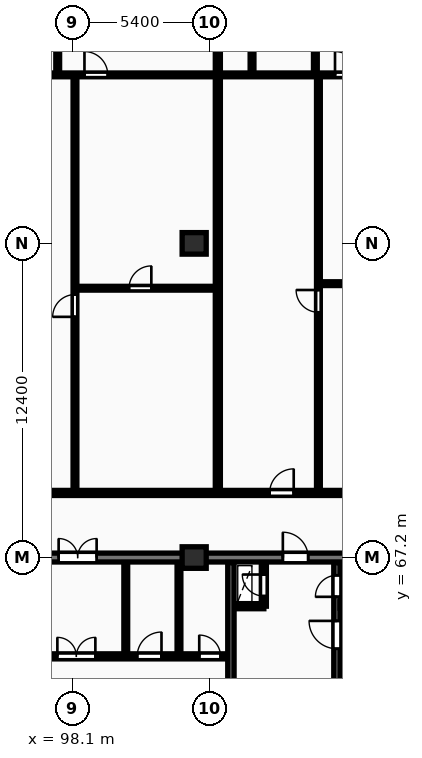
"""IFC4 building model, lengths in metres.
Left out: names, types, materials, properties, quantities, classifications, styles, units other than length and angle.
Written with IfcOpenShell. Run it as: python <this file> out.ifc"""

import sys

from ifc_helpers import new_model, si_unit, direction, frame, frame_2d, origin, origin_2d, place, context, subcontext, project, spatial, rectangle, extrude, element, fill, save


model = new_model("IFC4")
c1 = context("Model", 3, precision=1e-05, world=origin(), true_north=direction((0.0, 1.0)))
c2 = subcontext(c1, "Body", "Model", "MODEL_VIEW")
j1 = project(units=[si_unit("LENGTHUNIT", "METRE"), si_unit("PLANEANGLEUNIT", "RADIAN")], contexts=[c1])
p1 = place(None, origin())
s1 = spatial("IfcSite", under=j1, at=p1, CompositionType="ELEMENT")
p2 = place(p1, origin())
s2 = spatial("IfcBuilding", under=s1, at=p2, CompositionType="ELEMENT")
p3 = place(p2, frame((0.0, 0.0, 100.3)))
s3 = spatial("IfcBuildingStorey", under=s2, at=p3, CompositionType="ELEMENT", Elevation=100.3)
for number, where, z_axis, x_axis in (
    (1, (102.9, 67.2, 0.0), (0.0, 0.0, 1.0), (1.0, 0.0, 0.0)),
    (2, (102.9, 79.6, 0.0), (0.0, 0.0, 1.0), (1.0, 0.0, 0.0)),
):
    element("IfcColumn", number, at=place(p3, frame(where, z_axis=z_axis, x_axis=x_axis)), inside=s3, PredefinedType="COLUMN", context=c2, shape_type="SweptSolid", body=[
        extrude(rectangle(XDim=0.95, YDim=0.85, at=origin_2d()), origin(), (0.0, 0.0, 1.0), 3.25),
    ])
p4 = place(p3, frame((75.95, 67.2, 0.0), z_axis=(0.0, 0.0, 1.0), x_axis=(1.0, 0.0, 0.0)))
e3 = element("IfcWall", 3, at=p4, inside=s3, PredefinedType="SHEAR", context=c2, shape_type="SweptSolid", body=[
    extrude(rectangle(XDim=36.3, YDim=0.35, at=frame_2d((18.15, 0.0))), origin(), (0.0, 0.0, 1.0), 3.25),
])
p5 = place(p4, frame((5.25, 0.0, 0.0)))
e4 = element("IfcOpeningElement", 4, at=p5, cuts=e3, PredefinedType="OPENING", context=c2, shape_type="SweptSolid", body=[
    extrude(rectangle(XDim=1.0, YDim=2.15, at=frame_2d((0.5, 1.075))), frame((0.0, 0.185, 0.0), z_axis=(0.0, -1.0, 0.0), x_axis=(1.0, 0.0, 0.0)), (0.0, 0.0, 1.0), 0.37),
])
p6 = place(p4, frame((21.6, 0.0, 0.0)))
e5 = element("IfcOpeningElement", 5, at=p6, cuts=e3, PredefinedType="OPENING", context=c2, shape_type="SweptSolid", body=[
    extrude(rectangle(XDim=1.5, YDim=2.2, at=frame_2d((0.75, 1.1))), frame((0.0, 0.185, 0.0), z_axis=(0.0, -1.0, 0.0), x_axis=(1.0, 0.0, 0.0)), (0.0, 0.0, 1.0), 0.37),
])
p7 = place(p4, frame((30.45, 0.0, 0.0)))
e6 = element("IfcOpeningElement", 6, at=p7, cuts=e3, PredefinedType="OPENING", context=c2, shape_type="SweptSolid", body=[
    extrude(rectangle(XDim=1.0, YDim=2.15, at=frame_2d((0.5, 1.075))), frame((0.0, 0.185, 0.0), z_axis=(0.0, -1.0, 0.0), x_axis=(1.0, 0.0, 0.0)), (0.0, 0.0, 1.0), 0.37),
])
for number, where, z_axis, x_axis in (
    (7, (102.3, 63.4, 0.0), (0.0, 0.0, 1.0), (0.0, 1.0, 0.0)),
    (8, (100.2, 63.4, 0.0), (0.0, 0.0, 1.0), (0.0, 1.0, 0.0)),
):
    element("IfcWall", number, at=place(p3, frame(where, z_axis=z_axis, x_axis=x_axis)), inside=s3, PredefinedType="PARTITIONING", context=c2, shape_type="SweptSolid", body=[
        extrude(rectangle(XDim=3.6, YDim=0.15, at=frame_2d((1.8, 0.0))), origin(), (0.0, 0.0, 1.0), 2.97),
    ])
p8 = place(p3, frame((84.42, 63.3, 0.0), z_axis=(0.0, 0.0, 1.0), x_axis=(1.0, 0.0, 0.0)))
e9 = element("IfcWall", 9, at=p8, inside=s3, PredefinedType="PARTITIONING", context=c2, shape_type="SweptSolid", body=[
    extrude(rectangle(XDim=19.83, YDim=0.2, at=frame_2d((9.915, 0.0))), origin(), (0.0, 0.0, 1.0), 2.97),
])
p9 = place(p8, frame((1.15, 0.0, 0.0)))
e10 = element("IfcOpeningElement", 10, at=p9, cuts=e9, PredefinedType="OPENING", context=c2, shape_type="SweptSolid", body=[
    extrude(rectangle(XDim=0.85, YDim=2.05, at=frame_2d((0.425, 1.025))), frame((0.0, 0.11, 0.0), z_axis=(0.0, -1.0, 0.0), x_axis=(1.0, 0.0, 0.0)), (0.0, 0.0, 1.0), 0.22),
])
p10 = place(p8, frame((3.25, 0.0, 0.0)))
e11 = element("IfcOpeningElement", 11, at=p10, cuts=e9, PredefinedType="OPENING", context=c2, shape_type="SweptSolid", body=[
    extrude(rectangle(XDim=0.85, YDim=2.05, at=frame_2d((0.425, 1.025))), frame((0.0, 0.11, 0.0), z_axis=(0.0, -1.0, 0.0), x_axis=(1.0, 0.0, 0.0)), (0.0, 0.0, 1.0), 0.22),
])
p11 = place(p8, frame((13.08, 0.0, 0.0)))
e12 = element("IfcOpeningElement", 12, at=p11, cuts=e9, PredefinedType="OPENING", context=c2, shape_type="SweptSolid", body=[
    extrude(rectangle(XDim=1.5, YDim=2.2, at=frame_2d((0.75, 1.1))), frame((0.0, 0.11, 0.0), z_axis=(0.0, -1.0, 0.0), x_axis=(1.0, 0.0, 0.0)), (0.0, 0.0, 1.0), 0.22),
])
p12 = place(p8, frame((5.53, 0.0, 0.0)))
e13 = element("IfcOpeningElement", 13, at=p12, cuts=e9, PredefinedType="OPENING", context=c2, shape_type="SweptSolid", body=[
    extrude(rectangle(XDim=0.88, YDim=2.06, at=frame_2d((0.44, 1.03))), frame((0.0, 0.11, 0.0), z_axis=(0.0, -1.0, 0.0), x_axis=(1.0, 0.0, 0.0)), (0.0, 0.0, 1.0), 0.22),
])
p13 = place(p8, frame((7.68, 0.0, 0.0)))
e14 = element("IfcOpeningElement", 14, at=p13, cuts=e9, PredefinedType="OPENING", context=c2, shape_type="SweptSolid", body=[
    extrude(rectangle(XDim=0.88, YDim=2.06, at=frame_2d((0.44, 1.03))), frame((0.0, 0.11, 0.0), z_axis=(0.0, -1.0, 0.0), x_axis=(1.0, 0.0, 0.0)), (0.0, 0.0, 1.0), 0.22),
])
p14 = place(p8, frame((10.43, 0.0, 0.0)))
e15 = element("IfcOpeningElement", 15, at=p14, cuts=e9, PredefinedType="OPENING", context=c2, shape_type="SweptSolid", body=[
    extrude(rectangle(XDim=0.85, YDim=2.05, at=frame_2d((0.425, 1.025))), frame((0.0, 0.11, 0.0), z_axis=(0.0, -1.0, 0.0), x_axis=(1.0, 0.0, 0.0)), (0.0, 0.0, 1.0), 0.22),
])
p15 = place(p8, frame((16.23, 0.0, 0.0)))
e16 = element("IfcOpeningElement", 16, at=p15, cuts=e9, PredefinedType="OPENING", context=c2, shape_type="SweptSolid", body=[
    extrude(rectangle(XDim=0.96, YDim=2.1, at=frame_2d((0.48, 1.05))), frame((0.0, 0.11, 0.0), z_axis=(0.0, -1.0, 0.0), x_axis=(1.0, 0.0, 0.0)), (0.0, 0.0, 1.0), 0.22),
])
p16 = place(p8, frame((18.68, 0.0, 0.0)))
e17 = element("IfcOpeningElement", 17, at=p16, cuts=e9, PredefinedType="OPENING", context=c2, shape_type="SweptSolid", body=[
    extrude(rectangle(XDim=0.84, YDim=2.04, at=frame_2d((0.42, 1.02))), frame((0.0, 0.11, 0.0), z_axis=(0.0, -1.0, 0.0), x_axis=(1.0, 0.0, 0.0)), (0.0, 0.0, 1.0), 0.22),
])
p17 = place(p3, frame((104.45, 65.28, 0.0), z_axis=(0.0, 0.0, 1.0), x_axis=(1.0, 0.0, 0.0)))
e18 = element("IfcWall", 18, at=p17, inside=s3, PredefinedType="PARTITIONING", context=c2, shape_type="SweptSolid", body=[
    extrude(rectangle(XDim=1.2, YDim=0.2, at=frame_2d((0.6, 0.0))), origin(), (0.0, 0.0, 1.0), 2.97),
])
p18 = place(p3, frame((105.65, 65.28, 0.0), z_axis=(0.0, 0.0, 1.0), x_axis=(0.0, 1.0, 0.0)))
e19 = element("IfcWall", 19, at=p18, inside=s3, PredefinedType="PARTITIONING", context=c2, shape_type="SweptSolid", body=[
    extrude(rectangle(XDim=1.72, YDim=0.2, at=frame_2d((0.86, 0.0))), origin(), (0.0, 0.0, 1.0), 2.97),
])
p19 = place(p18, frame((0.4, 0.0, 0.0)))
e20 = element("IfcOpeningElement", 20, at=p19, cuts=e19, PredefinedType="OPENING", context=c2, shape_type="SweptSolid", body=[
    extrude(rectangle(XDim=0.85, YDim=2.05, at=frame_2d((0.425, 1.025))), frame((0.0, 0.11, 0.0), z_axis=(0.0, -1.0, 0.0), x_axis=(1.0, 0.0, 0.0)), (0.0, 0.0, 1.0), 0.22),
])
p20 = place(p3, frame((104.35, 58.4, 0.0), z_axis=(0.0, 0.0, 1.0), x_axis=(0.0, 1.0, 0.0)))
e21 = element("IfcWall", 21, at=p20, inside=s3, PredefinedType="SHEAR", context=c2, shape_type="SweptSolid", body=[
    extrude(rectangle(XDim=8.6, YDim=0.25, at=frame_2d((4.3, 0.0))), origin(), (0.0, 0.0, 1.0), 3.25),
])
p21 = place(p20, frame((1.8, 0.0, 0.0)))
e22 = element("IfcOpeningElement", 22, at=p21, cuts=e21, PredefinedType="OPENING", context=c2, shape_type="SweptSolid", body=[
    extrude(rectangle(XDim=1.1, YDim=2.1, at=frame_2d((0.55, 1.05))), frame((0.0, 0.135, 0.0), z_axis=(0.0, -1.0, 0.0), x_axis=(1.0, 0.0, 0.0)), (0.0, 0.0, 1.0), 0.27),
])
p22 = place(p3, frame((108.535, 55.4, 0.0), z_axis=(0.0, 0.0, 1.0), x_axis=(0.0, 1.0, 0.0)))
e23 = element("IfcWall", 23, at=p22, inside=s3, PredefinedType="SHEAR", context=c2, shape_type="SweptSolid", body=[
    extrude(rectangle(XDim=11.6, YDim=0.25, at=frame_2d((5.8, 0.0))), origin(), (0.0, 0.0, 1.0), 3.25),
])
p23 = place(p22, frame((8.2, 0.0, 0.0)))
e24 = element("IfcOpeningElement", 24, at=p23, cuts=e23, PredefinedType="OPENING", context=c2, shape_type="SweptSolid", body=[
    extrude(rectangle(XDim=1.1, YDim=2.1, at=frame_2d((0.55, 1.05))), frame((0.0, 0.135, 0.0), z_axis=(0.0, -1.0, 0.0), x_axis=(1.0, 0.0, 0.0)), (0.0, 0.0, 1.0), 0.27),
])
p24 = place(p22, frame((10.25, 0.0, 0.0)))
e25 = element("IfcOpeningElement", 25, at=p24, cuts=e23, PredefinedType="OPENING", context=c2, shape_type="SweptSolid", body=[
    extrude(rectangle(XDim=0.85, YDim=2.05, at=frame_2d((0.425, 1.025))), frame((0.0, 0.135, 0.0), z_axis=(0.0, -1.0, 0.0), x_axis=(1.0, 0.0, 0.0)), (0.0, 0.0, 1.0), 0.27),
])
p25 = place(p3, frame((108.66, 65.325, 0.0), z_axis=(0.0, 0.0, 1.0), x_axis=(1.0, 0.0, 0.0)))
e26 = element("IfcWall", 26, at=p25, inside=s3, PredefinedType="SHEAR", context=c2, shape_type="SweptSolid", body=[
    extrude(rectangle(XDim=3.24, YDim=0.25, at=frame_2d((1.62, 0.0))), origin(), (0.0, 0.0, 1.0), 3.25),
])
p26 = place(p3, frame((103.834, 69.83, 0.0), z_axis=(0.0, 0.0, 1.0), x_axis=(0.0, 1.0, 0.0)))
e27 = element("IfcWall", 27, at=p26, inside=s3, PredefinedType="PARTITIONING", context=c2, shape_type="SweptSolid", body=[
    extrude(rectangle(XDim=26.07, YDim=0.2, at=frame_2d((13.035, 0.0))), origin(), (0.0, 0.0, 1.0), 2.97),
])
p27 = place(p3, frame((98.255, 77.83, 0.0), z_axis=(0.0, 0.0, 1.0), x_axis=(1.0, 0.0, 0.0)))
e28 = element("IfcWall", 28, at=p27, inside=s3, PredefinedType="PARTITIONING", context=c2, shape_type="SweptSolid", body=[
    extrude(rectangle(XDim=5.499, YDim=0.15, at=frame_2d((2.75, 0.0))), origin(), (0.0, 0.0, 1.0), 2.97),
])
p28 = place(p27, frame((2.074, 0.0, 0.0)))
e29 = element("IfcOpeningElement", 29, at=p28, cuts=e28, PredefinedType="OPENING", context=c2, shape_type="SweptSolid", body=[
    extrude(rectangle(XDim=0.88, YDim=2.06, at=frame_2d((0.44, 1.03))), frame((0.0, 0.085, 0.0), z_axis=(0.0, -1.0, 0.0), x_axis=(1.0, 0.0, 0.0)), (0.0, 0.0, 1.0), 0.17),
])
p29 = place(p3, frame((98.195, 69.81, 0.0), z_axis=(0.0, 0.0, 1.0), x_axis=(0.0, 1.0, 0.0)))
e30 = element("IfcWall", 30, at=p29, inside=s3, PredefinedType="PARTITIONING", context=c2, shape_type="SweptSolid", body=[
    extrude(rectangle(XDim=16.4, YDim=0.15, at=frame_2d((8.2, 0.0))), origin(), (0.0, 0.0, 1.0), 2.97),
])
p30 = place(p29, frame((6.89, 0.0, 0.0)))
e31 = element("IfcOpeningElement", 31, at=p30, cuts=e30, PredefinedType="OPENING", context=c2, shape_type="SweptSolid", body=[
    extrude(rectangle(XDim=0.88, YDim=2.06, at=frame_2d((0.44, 1.03))), frame((0.0, 0.085, 0.0), z_axis=(0.0, -1.0, 0.0), x_axis=(1.0, 0.0, 0.0)), (0.0, 0.0, 1.0), 0.17),
])
p31 = place(p3, frame((97.514, 86.29, 0.0), z_axis=(0.0, 0.0, 1.0), x_axis=(0.0, 1.0, 0.0)))
e32 = element("IfcWall", 32, at=p31, inside=s3, PredefinedType="PARTITIONING", context=c2, shape_type="SweptSolid", body=[
    extrude(rectangle(XDim=5.0, YDim=0.15, at=frame_2d((2.5, 0.0))), origin(), (0.0, 0.0, 1.0), 2.97),
])
p32 = place(p31, frame((2.08, 0.0, 0.0)))
e33 = element("IfcOpeningElement", 33, at=p32, cuts=e32, PredefinedType="OPENING", context=c2, shape_type="SweptSolid", body=[
    extrude(rectangle(XDim=0.84, YDim=2.04, at=frame_2d((0.42, 1.02))), frame((0.0, 0.085, 0.0), z_axis=(0.0, -1.0, 0.0), x_axis=(1.0, 0.0, 0.0)), (0.0, 0.0, 1.0), 0.17),
])
p33 = place(p3, frame((94.305, 86.25, 0.0), z_axis=(0.0, 0.0, 1.0), x_axis=(1.0, 0.0, 0.0)))
e34 = element("IfcWall", 34, at=p33, inside=s3, PredefinedType="PARTITIONING", context=c2, shape_type="SweptSolid", body=[
    extrude(rectangle(XDim=9.449, YDim=0.15, at=frame_2d((4.725, 0.0))), origin(), (0.0, 0.0, 1.0), 2.97),
])
p34 = place(p33, frame((4.264, 0.0, 0.0)))
e35 = element("IfcOpeningElement", 35, at=p34, cuts=e34, PredefinedType="OPENING", context=c2, shape_type="SweptSolid", body=[
    extrude(rectangle(XDim=0.92, YDim=2.08, at=frame_2d((0.46, 1.04))), frame((0.0, 0.085, 0.0), z_axis=(0.0, -1.0, 0.0), x_axis=(1.0, 0.0, 0.0)), (0.0, 0.0, 1.0), 0.17),
])
p35 = place(p3, frame((107.864, 78.01, 0.0), z_axis=(0.0, 0.0, 1.0), x_axis=(1.0, 0.0, 0.0)))
e36 = element("IfcWall", 36, at=p35, inside=s3, PredefinedType="PARTITIONING", context=c2, shape_type="SweptSolid", body=[
    extrude(rectangle(XDim=6.06, YDim=0.15, at=frame_2d((3.03, 0.0))), origin(), (0.0, 0.0, 1.0), 2.97),
])
p36 = place(p35, frame((1.694, 0.0, 0.0)))
e37 = element("IfcOpeningElement", 37, at=p36, cuts=e36, PredefinedType="OPENING", context=c2, shape_type="SweptSolid", body=[
    extrude(rectangle(XDim=0.88, YDim=2.06, at=frame_2d((0.44, 1.03))), frame((0.0, 0.085, 0.0), z_axis=(0.0, -1.0, 0.0), x_axis=(1.0, 0.0, 0.0)), (0.0, 0.0, 1.0), 0.17),
])
p37 = place(p3, frame((107.804, 69.81, 0.0), z_axis=(0.0, 0.0, 1.0), x_axis=(0.0, 1.0, 0.0)))
e38 = element("IfcWall", 38, at=p37, inside=s3, PredefinedType="PARTITIONING", context=c2, shape_type="SweptSolid", body=[
    extrude(rectangle(XDim=16.4, YDim=0.15, at=frame_2d((8.2, 0.0))), origin(), (0.0, 0.0, 1.0), 2.97),
])
p38 = place(p37, frame((7.07, 0.0, 0.0)))
e39 = element("IfcOpeningElement", 39, at=p38, cuts=e38, PredefinedType="OPENING", context=c2, shape_type="SweptSolid", body=[
    extrude(rectangle(XDim=0.88, YDim=2.06, at=frame_2d((0.44, 1.03))), frame((0.0, 0.085, 0.0), z_axis=(0.0, -1.0, 0.0), x_axis=(1.0, 0.0, 0.0)), (0.0, 0.0, 1.0), 0.17),
])
p39 = place(p3, frame((105.184, 86.29, 0.0), z_axis=(0.0, 0.0, 1.0), x_axis=(0.0, 1.0, 0.0)))
e40 = element("IfcWall", 40, at=p39, inside=s3, PredefinedType="PARTITIONING", context=c2, shape_type="SweptSolid", body=[
    extrude(rectangle(XDim=5.0, YDim=0.15, at=frame_2d((2.5, 0.0))), origin(), (0.0, 0.0, 1.0), 2.97),
])
p40 = place(p39, frame((2.08, 0.0, 0.0)))
e41 = element("IfcOpeningElement", 41, at=p40, cuts=e40, PredefinedType="OPENING", context=c2, shape_type="SweptSolid", body=[
    extrude(rectangle(XDim=0.84, YDim=2.04, at=frame_2d((0.42, 1.02))), frame((0.0, 0.085, 0.0), z_axis=(0.0, -1.0, 0.0), x_axis=(1.0, 0.0, 0.0)), (0.0, 0.0, 1.0), 0.17),
])
p41 = place(p3, frame((107.684, 86.29, 0.0), z_axis=(0.0, 0.0, 1.0), x_axis=(0.0, 1.0, 0.0)))
e42 = element("IfcWall", 42, at=p41, inside=s3, PredefinedType="PARTITIONING", context=c2, shape_type="SweptSolid", body=[
    extrude(rectangle(XDim=5.0, YDim=0.15, at=frame_2d((2.5, 0.0))), origin(), (0.0, 0.0, 1.0), 2.97),
])
p42 = place(p41, frame((2.08, 0.0, 0.0)))
e43 = element("IfcOpeningElement", 43, at=p42, cuts=e42, PredefinedType="OPENING", context=c2, shape_type="SweptSolid", body=[
    extrude(rectangle(XDim=0.84, YDim=2.04, at=frame_2d((0.42, 1.02))), frame((0.0, 0.085, 0.0), z_axis=(0.0, -1.0, 0.0), x_axis=(1.0, 0.0, 0.0)), (0.0, 0.0, 1.0), 0.17),
])
p43 = place(p3, frame((103.914, 86.25, 0.0), z_axis=(0.0, 0.0, 1.0), x_axis=(1.0, 0.0, 0.0)))
e44 = element("IfcWall", 44, at=p43, inside=s3, PredefinedType="PARTITIONING", context=c2, shape_type="SweptSolid", body=[
    extrude(rectangle(XDim=10.01, YDim=0.15, at=frame_2d((5.005, 0.0))), origin(), (0.0, 0.0, 1.0), 2.97),
])
p44 = place(p43, frame((4.545, 0.0, 0.0)))
e45 = element("IfcOpeningElement", 45, at=p44, cuts=e44, PredefinedType="OPENING", context=c2, shape_type="SweptSolid", body=[
    extrude(rectangle(XDim=0.92, YDim=2.08, at=frame_2d((0.46, 1.04))), frame((0.0, 0.085, 0.0), z_axis=(0.0, -1.0, 0.0), x_axis=(1.0, 0.0, 0.0)), (0.0, 0.0, 1.0), 0.17),
])
p45 = place(p3, frame((57.6, 69.75, 0.0), z_axis=(0.0, 0.0, 1.0), x_axis=(1.0, 0.0, 0.0)))
e46 = element("IfcWall", 46, at=p45, inside=s3, PredefinedType="PARTITIONING", context=c2, shape_type="SweptSolid", body=[
    extrude(rectangle(XDim=73.0, YDim=0.2, at=frame_2d((36.5, 0.0))), origin(), (0.0, 0.0, 1.0), 2.97),
])
p46 = place(p45, frame((7.326, 0.0, 0.0)))
e47 = element("IfcOpeningElement", 47, at=p46, cuts=e46, PredefinedType="OPENING", context=c2, shape_type="SweptSolid", body=[
    extrude(rectangle(XDim=1.22, YDim=2.18, at=frame_2d((0.61, 1.09))), frame((0.0, 0.11, 0.0), z_axis=(0.0, -1.0, 0.0), x_axis=(1.0, 0.0, 0.0)), (0.0, 0.0, 1.0), 0.22),
])
p47 = place(p45, frame((23.795, 0.0, 0.0)))
e48 = element("IfcOpeningElement", 48, at=p47, cuts=e46, PredefinedType="OPENING", context=c2, shape_type="SweptSolid", body=[
    extrude(rectangle(XDim=1.22, YDim=2.18, at=frame_2d((0.61, 1.09))), frame((0.0, 0.11, 0.0), z_axis=(0.0, -1.0, 0.0), x_axis=(1.0, 0.0, 0.0)), (0.0, 0.0, 1.0), 0.22),
])
p48 = place(p45, frame((38.67, 0.0, 0.0)))
e49 = element("IfcOpeningElement", 49, at=p48, cuts=e46, PredefinedType="OPENING", context=c2, shape_type="SweptSolid", body=[
    extrude(rectangle(XDim=0.95, YDim=2.15, at=frame_2d((0.475, 1.075))), frame((0.0, 0.11, 0.0), z_axis=(0.0, -1.0, 0.0), x_axis=(1.0, 0.0, 0.0)), (0.0, 0.0, 1.0), 0.22),
])
p49 = place(p45, frame((48.279, 0.0, 0.0)))
e50 = element("IfcOpeningElement", 50, at=p49, cuts=e46, PredefinedType="OPENING", context=c2, shape_type="SweptSolid", body=[
    extrude(rectangle(XDim=0.95, YDim=2.15, at=frame_2d((0.475, 1.075))), frame((0.0, 0.11, 0.0), z_axis=(0.0, -1.0, 0.0), x_axis=(1.0, 0.0, 0.0)), (0.0, 0.0, 1.0), 0.22),
])
p50 = place(p45, frame((58.449, 0.0, 0.0)))
e51 = element("IfcOpeningElement", 51, at=p50, cuts=e46, PredefinedType="OPENING", context=c2, shape_type="SweptSolid", body=[
    extrude(rectangle(XDim=0.95, YDim=2.15, at=frame_2d((0.475, 1.075))), frame((0.0, 0.11, 0.0), z_axis=(0.0, -1.0, 0.0), x_axis=(1.0, 0.0, 0.0)), (0.0, 0.0, 1.0), 0.22),
])
p51 = place(p6, origin())
e52 = element("IfcDoor", 52, at=p51, inside=s3, OperationType="DOUBLE_DOOR_SINGLE_SWING", PredefinedType="DOOR", context=c2, shape_type="SweptSolid", body=[
    extrude(rectangle(XDim=1.5, YDim=2.2, at=frame_2d((0.75, 1.1))), frame((0.0, 0.025, 0.0), z_axis=(0.0, -1.0, 0.0), x_axis=(1.0, 0.0, 0.0)), (0.0, 0.0, 1.0), 0.05),
])
fill(e5, e52)
p52 = place(p7, origin())
e53 = element("IfcDoor", 53, at=p52, inside=s3, OperationType="SINGLE_SWING_LEFT", PredefinedType="DOOR", context=c2, shape_type="SweptSolid", body=[
    extrude(rectangle(XDim=1.0, YDim=2.15, at=frame_2d((0.5, 1.075))), frame((0.0, 0.025, 0.0), z_axis=(0.0, -1.0, 0.0), x_axis=(1.0, 0.0, 0.0)), (0.0, 0.0, 1.0), 0.05),
])
fill(e6, e53)
p53 = place(p11, origin())
e54 = element("IfcDoor", 54, at=p53, inside=s3, OperationType="DOUBLE_DOOR_SINGLE_SWING", PredefinedType="DOOR", context=c2, shape_type="SweptSolid", body=[
    extrude(rectangle(XDim=1.5, YDim=2.2, at=frame_2d((0.75, 1.1))), frame((0.0, 0.025, 0.0), z_axis=(0.0, -1.0, 0.0), x_axis=(1.0, 0.0, 0.0)), (0.0, 0.0, 1.0), 0.05),
])
fill(e12, e54)
p54 = place(p15, origin())
e55 = element("IfcDoor", 55, at=p54, inside=s3, OperationType="SINGLE_SWING_RIGHT", PredefinedType="DOOR", context=c2, shape_type="SweptSolid", body=[
    extrude(rectangle(XDim=0.96, YDim=2.1, at=frame_2d((0.48, 1.05))), frame((0.0, 0.025, 0.0), z_axis=(0.0, -1.0, 0.0), x_axis=(1.0, 0.0, 0.0)), (0.0, 0.0, 1.0), 0.05),
])
fill(e16, e55)
p55 = place(p16, origin())
e56 = element("IfcDoor", 56, at=p55, inside=s3, OperationType="SINGLE_SWING_LEFT", PredefinedType="DOOR", context=c2, shape_type="SweptSolid", body=[
    extrude(rectangle(XDim=0.84, YDim=2.04, at=frame_2d((0.42, 1.02))), frame((0.0, 0.025, 0.0), z_axis=(0.0, -1.0, 0.0), x_axis=(1.0, 0.0, 0.0)), (0.0, 0.0, 1.0), 0.05),
])
fill(e17, e56)
p56 = place(p19, origin())
e57 = element("IfcDoor", 57, at=p56, inside=s3, OperationType="SINGLE_SWING_RIGHT", PredefinedType="DOOR", context=c2, shape_type="SweptSolid", body=[
    extrude(rectangle(XDim=0.85, YDim=2.05, at=frame_2d((0.425, 1.025))), frame((0.0, 0.025, 0.0), z_axis=(0.0, -1.0, 0.0), x_axis=(1.0, 0.0, 0.0)), (0.0, 0.0, 1.0), 0.05),
])
fill(e20, e57)
p57 = place(p23, origin())
e58 = element("IfcDoor", 58, at=p57, inside=s3, OperationType="SINGLE_SWING_RIGHT", PredefinedType="DOOR", context=c2, shape_type="SweptSolid", body=[
    extrude(rectangle(XDim=1.1, YDim=2.1, at=frame_2d((0.55, 1.05))), frame((0.0, 0.025, 0.0), z_axis=(0.0, -1.0, 0.0), x_axis=(1.0, 0.0, 0.0)), (0.0, 0.0, 1.0), 0.05),
])
fill(e24, e58)
p58 = place(p24, origin())
e59 = element("IfcDoor", 59, at=p58, inside=s3, OperationType="SINGLE_SWING_LEFT", PredefinedType="DOOR", context=c2, shape_type="SweptSolid", body=[
    extrude(rectangle(XDim=0.85, YDim=2.05, at=frame_2d((0.425, 1.025))), frame((0.0, 0.025, 0.0), z_axis=(0.0, -1.0, 0.0), x_axis=(1.0, 0.0, 0.0)), (0.0, 0.0, 1.0), 0.05),
])
fill(e25, e59)
p59 = place(p28, origin())
e60 = element("IfcDoor", 60, at=p59, inside=s3, OperationType="SINGLE_SWING_RIGHT", PredefinedType="DOOR", context=c2, shape_type="SweptSolid", body=[
    extrude(rectangle(XDim=0.88, YDim=2.06, at=frame_2d((0.44, 1.03))), frame((0.0, 0.025, 0.0), z_axis=(0.0, -1.0, 0.0), x_axis=(1.0, 0.0, 0.0)), (0.0, 0.0, 1.0), 0.05),
])
fill(e29, e60)
p60 = place(p30, origin())
e61 = element("IfcDoor", 61, at=p60, inside=s3, OperationType="SINGLE_SWING_LEFT", PredefinedType="DOOR", context=c2, shape_type="SweptSolid", body=[
    extrude(rectangle(XDim=0.88, YDim=2.06, at=frame_2d((0.44, 1.03))), frame((0.0, 0.025, 0.0), z_axis=(0.0, -1.0, 0.0), x_axis=(1.0, 0.0, 0.0)), (0.0, 0.0, 1.0), 0.05),
])
fill(e31, e61)
p61 = place(p34, origin())
e62 = element("IfcDoor", 62, at=p61, inside=s3, OperationType="SINGLE_SWING_LEFT", PredefinedType="DOOR", context=c2, shape_type="SweptSolid", body=[
    extrude(rectangle(XDim=0.92, YDim=2.08, at=frame_2d((0.46, 1.04))), frame((0.0, 0.025, 0.0), z_axis=(0.0, -1.0, 0.0), x_axis=(1.0, 0.0, 0.0)), (0.0, 0.0, 1.0), 0.05),
])
fill(e35, e62)
p62 = place(p38, origin())
e63 = element("IfcDoor", 63, at=p62, inside=s3, OperationType="SINGLE_SWING_RIGHT", PredefinedType="DOOR", context=c2, shape_type="SweptSolid", body=[
    extrude(rectangle(XDim=0.88, YDim=2.06, at=frame_2d((0.44, 1.03))), frame((0.0, 0.025, 0.0), z_axis=(0.0, -1.0, 0.0), x_axis=(1.0, 0.0, 0.0)), (0.0, 0.0, 1.0), 0.05),
])
fill(e39, e63)
p63 = place(p44, origin())
e64 = element("IfcDoor", 64, at=p63, inside=s3, OperationType="SINGLE_SWING_LEFT", PredefinedType="DOOR", context=c2, shape_type="SweptSolid", body=[
    extrude(rectangle(XDim=0.92, YDim=2.08, at=frame_2d((0.46, 1.04))), frame((0.0, 0.025, 0.0), z_axis=(0.0, -1.0, 0.0), x_axis=(1.0, 0.0, 0.0)), (0.0, 0.0, 1.0), 0.05),
])
fill(e45, e64)
p64 = place(p49, origin())
e65 = element("IfcDoor", 65, at=p64, inside=s3, OperationType="SINGLE_SWING_RIGHT", PredefinedType="DOOR", context=c2, shape_type="SweptSolid", body=[
    extrude(rectangle(XDim=0.95, YDim=2.15, at=frame_2d((0.475, 1.075))), frame((0.0, 0.025, 0.0), z_axis=(0.0, -1.0, 0.0), x_axis=(1.0, 0.0, 0.0)), (0.0, 0.0, 1.0), 0.05),
])
fill(e50, e65)
save(model, sys.argv[1])
